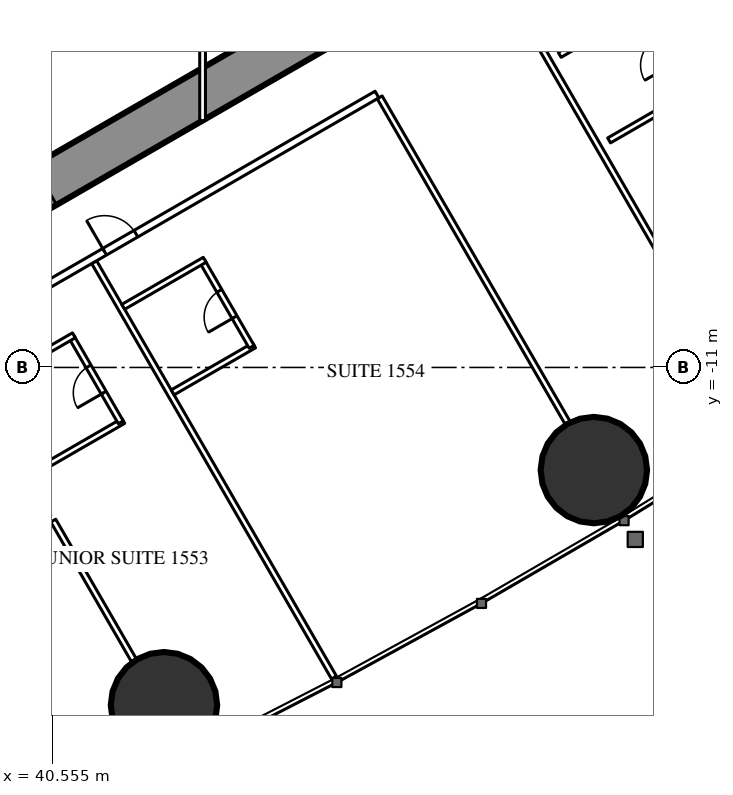
"""IFC4 building model, lengths in metres.
Left out: names, types, materials, properties, quantities, classifications, styles, units other than length and angle.
Written with IfcOpenShell. Run it as: python <this file> out.ifc"""

import sys

from ifc_helpers import new_model, si_unit, direction, frame, frame_2d, origin, origin_2d, place, context, subcontext, project, spatial, rectangle, hollow_circle, extrude, element, fill, save


model = new_model("IFC4")
c1 = context("Model", 3, precision=1e-05, world=origin(), true_north=direction((0.0, 1.0)))
c2 = subcontext(c1, "Body", "Model", "MODEL_VIEW")
j1 = project(units=[si_unit("LENGTHUNIT", "METRE"), si_unit("PLANEANGLEUNIT", "RADIAN")], contexts=[c1])
p1 = place(None, origin())
s1 = spatial("IfcSite", under=j1, at=p1, CompositionType="ELEMENT")
p2 = place(p1, origin())
s2 = spatial("IfcBuilding", under=s1, at=p2, CompositionType="ELEMENT")
p3 = place(p2, frame((0.0, 0.0, 60.0)))
s3 = spatial("IfcBuildingStorey", under=s2, at=p3, CompositionType="ELEMENT", Elevation=60.0)
for number, where, z_axis, x_axis in (
    (1, (43.484, -19.886, 0.0), (0.0, 0.0, 1.0), (1.0, 0.0, 0.0)),
    (2, (54.795, -13.701, 0.0), (0.0, 0.0, 1.0), (1.0, 0.0, 0.0)),
):
    element("IfcColumn", number, at=place(p3, frame(where, z_axis=z_axis, x_axis=x_axis)), inside=s3, PredefinedType="COLUMN", context=c2, shape_type="SweptSolid", body=[
        extrude(hollow_circle(Radius=1.4, WallThickness=0.12, at=origin_2d()), origin(), (0.0, 0.0, 1.0), 3.5),
    ])
p4 = place(p3, frame((27.2, -13.8, 0.0), z_axis=(0.0, 0.0, 1.0), x_axis=(0.866027159892, 0.499996958321, 0.0)))
e3 = element("IfcWall", 3, at=p4, inside=s3, PredefinedType="SHEAR", context=c2, shape_type="SweptSolid", body=[
    extrude(rectangle(XDim=27.947, YDim=1.2, at=frame_2d((13.973, 0.0))), origin(), (0.0, 0.0, 1.0), 3.5),
])
p5 = place(p4, frame((4.6, 0.0, 0.0)))
e4 = element("IfcOpeningElement", 4, at=p5, cuts=e3, PredefinedType="OPENING", context=c2, shape_type="SweptSolid", body=[
    extrude(rectangle(XDim=1.0, YDim=2.2, at=frame_2d((0.5, 1.1))), frame((0.0, 0.61, 0.0), z_axis=(0.0, -1.0, 0.0), x_axis=(1.0, 0.0, 0.0)), (0.0, 0.0, 1.0), 1.22),
])
p6 = place(p4, frame((13.395, 0.0, 0.0)))
e5 = element("IfcOpeningElement", 5, at=p6, cuts=e3, PredefinedType="OPENING", context=c2, shape_type="SweptSolid", body=[
    extrude(rectangle(XDim=1.8, YDim=2.2, at=frame_2d((0.9, 1.1))), frame((0.0, 0.61, 0.0), z_axis=(0.0, -1.0, 0.0), x_axis=(1.0, 0.0, 0.0)), (0.0, 0.0, 1.0), 1.22),
])
p7 = place(p3, frame((41.647, -8.23, 0.0), z_axis=(0.0, 0.0, 1.0), x_axis=(0.49998590462, -0.866033541603, 0.0)))
e6 = element("IfcWall", 6, at=p7, inside=s3, PredefinedType="PARTITIONING", context=c2, shape_type="SweptSolid", body=[
    extrude(rectangle(XDim=12.621, YDim=0.15, at=frame_2d((6.311, 0.0))), origin(), (0.0, 0.0, 1.0), 3.25),
])
p8 = place(p3, frame((49.159, -3.893, 0.0), z_axis=(0.0, 0.0, 1.0), x_axis=(0.499998773722, -0.866026111775, 0.0)))
e7 = element("IfcWall", 7, at=p8, inside=s3, PredefinedType="PARTITIONING", context=c2, shape_type="SweptSolid", body=[
    extrude(rectangle(XDim=9.892, YDim=0.15, at=frame_2d((4.946, 0.0))), origin(), (0.0, 0.0, 1.0), 2.25),
])
p9 = place(p3, frame((52.915, -1.725, 0.0), z_axis=(0.0, 0.0, 1.0), x_axis=(0.499997163113, -0.866027041656, 0.0)))
e8 = element("IfcWall", 8, at=p9, inside=s3, PredefinedType="PARTITIONING", context=c2, shape_type="SweptSolid", body=[
    extrude(rectangle(XDim=12.591, YDim=0.15, at=frame_2d((6.295, 0.0))), origin(), (0.0, 0.0, 1.0), 3.25),
])
p10 = place(p3, frame((40.57, -15.03, 0.0), z_axis=(0.0, 0.0, 1.0), x_axis=(0.500012993597, -0.866017901798, 0.0)))
e9 = element("IfcWall", 9, at=p10, inside=s3, PredefinedType="PARTITIONING", context=c2, shape_type="SweptSolid", body=[
    extrude(rectangle(XDim=4.243, YDim=0.15, at=frame_2d((2.122, 0.0))), origin(), (0.0, 0.0, 1.0), 3.25),
])
p11 = place(p3, frame((37.96, -10.243, 0.0), z_axis=(0.0, 0.0, 1.0), x_axis=(0.866030548046, 0.499991089772, 0.0)))
e10 = element("IfcWall", 10, at=p11, inside=s3, PredefinedType="PARTITIONING", context=c2, shape_type="SweptSolid", body=[
    extrude(rectangle(XDim=12.849, YDim=0.2, at=frame_2d((6.425, 0.0))), origin(), (0.0, 0.0, 1.0), 3.25),
])
p12 = place(p11, frame((4.575, 0.0, 0.0)))
e11 = element("IfcOpeningElement", 11, at=p12, cuts=e10, PredefinedType="OPENING", context=c2, shape_type="SweptSolid", body=[
    extrude(rectangle(XDim=0.95, YDim=2.2, at=frame_2d((0.475, 1.1))), frame((0.0, 0.11, 0.0), z_axis=(0.0, -1.0, 0.0), x_axis=(1.0, 0.0, 0.0)), (0.0, 0.0, 1.0), 0.22),
])
p13 = place(p11, frame((0.6, 0.0, 0.0)))
e12 = element("IfcOpeningElement", 12, at=p13, cuts=e10, PredefinedType="OPENING", context=c2, shape_type="SweptSolid", body=[
    extrude(rectangle(XDim=0.95, YDim=2.2, at=frame_2d((0.475, 1.1))), frame((0.0, 0.11, 0.0), z_axis=(0.0, -1.0, 0.0), x_axis=(1.0, 0.0, 0.0)), (0.0, 0.0, 1.0), 0.22),
])
p14 = place(p3, frame((43.712, -11.657, 0.0), z_axis=(0.0, 0.0, 1.0), x_axis=(0.866006523861, 0.500032699561, 0.0)))
e13 = element("IfcWall", 13, at=p14, inside=s3, PredefinedType="PARTITIONING", context=c2, shape_type="SweptSolid", body=[
    extrude(rectangle(XDim=2.475, YDim=0.15, at=frame_2d((1.237, 0.0))), origin(), (0.0, 0.0, 1.0), 3.25),
])
p15 = place(p3, frame((44.491, -8.205, 0.0), z_axis=(0.0, 0.0, 1.0), x_axis=(0.500047596559, -0.865997922154, 0.0)))
e14 = element("IfcWall", 14, at=p15, inside=s3, PredefinedType="PARTITIONING", context=c2, shape_type="SweptSolid", body=[
    extrude(rectangle(XDim=2.6, YDim=0.15, at=frame_2d((1.3, 0.0))), origin(), (0.0, 0.0, 1.0), 3.25),
])
p16 = place(p15, frame((0.9, 0.0, 0.0)))
e15 = element("IfcOpeningElement", 15, at=p16, cuts=e14, PredefinedType="OPENING", context=c2, shape_type="SweptSolid", body=[
    extrude(rectangle(XDim=0.8, YDim=2.2, at=frame_2d((0.4, 1.1))), frame((0.0, 0.085, 0.0), z_axis=(0.0, -1.0, 0.0), x_axis=(1.0, 0.0, 0.0)), (0.0, 0.0, 1.0), 0.17),
])
p17 = place(p3, frame((42.412, -9.405, 0.0), z_axis=(0.0, 0.0, 1.0), x_axis=(0.866006523861, 0.500032699561, 0.0)))
e16 = element("IfcWall", 16, at=p17, inside=s3, PredefinedType="PARTITIONING", context=c2, shape_type="SweptSolid", body=[
    extrude(rectangle(XDim=2.475, YDim=0.15, at=frame_2d((1.237, 0.0))), origin(), (0.0, 0.0, 1.0), 3.25),
])
p18 = place(p3, frame((55.196, -5.026, 0.0), z_axis=(0.0, 0.0, 1.0), x_axis=(0.866073894602, 0.499916002032, 0.0)))
e17 = element("IfcWall", 17, at=p18, inside=s3, PredefinedType="PARTITIONING", context=c2, shape_type="SweptSolid", body=[
    extrude(rectangle(XDim=2.475, YDim=0.15, at=frame_2d((1.238, 0.0))), origin(), (0.0, 0.0, 1.0), 3.25),
])
p19 = place(p3, frame((55.975, -1.575, 0.0), z_axis=(0.0, 0.0, 1.0), x_axis=(0.500006934395, -0.866021400173, 0.0)))
e18 = element("IfcWall", 18, at=p19, inside=s3, PredefinedType="PARTITIONING", context=c2, shape_type="SweptSolid", body=[
    extrude(rectangle(XDim=2.6, YDim=0.15, at=frame_2d((1.3, 0.0))), origin(), (0.0, 0.0, 1.0), 3.25),
])
p20 = place(p19, frame((0.9, 0.0, 0.0)))
e19 = element("IfcOpeningElement", 19, at=p20, cuts=e18, PredefinedType="OPENING", context=c2, shape_type="SweptSolid", body=[
    extrude(rectangle(XDim=0.8, YDim=2.2, at=frame_2d((0.4, 1.1))), frame((0.0, 0.085, 0.0), z_axis=(0.0, -1.0, 0.0), x_axis=(1.0, 0.0, 0.0)), (0.0, 0.0, 1.0), 0.17),
])
p21 = place(p3, frame((53.896, -2.775, 0.0), z_axis=(0.0, 0.0, 1.0), x_axis=(0.866006523861, 0.500032699561, 0.0)))
e20 = element("IfcWall", 20, at=p21, inside=s3, PredefinedType="PARTITIONING", context=c2, shape_type="SweptSolid", body=[
    extrude(rectangle(XDim=2.475, YDim=0.15, at=frame_2d((1.237, 0.0))), origin(), (0.0, 0.0, 1.0), 3.25),
])
p22 = place(p3, frame((40.27, -13.644, 0.0), z_axis=(0.0, 0.0, 1.0), x_axis=(0.866031185235, 0.4999899861, 0.0)))
e21 = element("IfcWall", 21, at=p22, inside=s3, PredefinedType="PARTITIONING", context=c2, shape_type="SweptSolid", body=[
    extrude(rectangle(XDim=2.475, YDim=0.15, at=frame_2d((1.238, 0.0))), origin(), (0.0, 0.0, 1.0), 3.25),
])
p23 = place(p3, frame((41.048, -10.193, 0.0), z_axis=(0.0, 0.0, 1.0), x_axis=(0.500047596559, -0.865997922154, 0.0)))
e22 = element("IfcWall", 22, at=p23, inside=s3, PredefinedType="PARTITIONING", context=c2, shape_type="SweptSolid", body=[
    extrude(rectangle(XDim=2.6, YDim=0.15, at=frame_2d((1.3, 0.0))), origin(), (0.0, 0.0, 1.0), 3.25),
])
p24 = place(p23, frame((0.9, 0.0, 0.0)))
e23 = element("IfcOpeningElement", 23, at=p24, cuts=e22, PredefinedType="OPENING", context=c2, shape_type="SweptSolid", body=[
    extrude(rectangle(XDim=0.8, YDim=2.2, at=frame_2d((0.4, 1.1))), frame((0.0, 0.085, 0.0), z_axis=(0.0, -1.0, 0.0), x_axis=(1.0, 0.0, 0.0)), (0.0, 0.0, 1.0), 0.17),
])
p25 = place(p3, frame((38.97, -11.393, 0.0), z_axis=(0.0, 0.0, 1.0), x_axis=(0.866031185235, 0.4999899861, 0.0)))
e24 = element("IfcWall", 24, at=p25, inside=s3, PredefinedType="PARTITIONING", context=c2, shape_type="SweptSolid", body=[
    extrude(rectangle(XDim=2.475, YDim=0.15, at=frame_2d((1.238, 0.0))), origin(), (0.0, 0.0, 1.0), 3.25),
])
p26 = place(p3, frame((44.5, -4.505, 0.0), z_axis=(0.0, 0.0, 1.0), x_axis=(0.0, 1.0, 0.0)))
e25 = element("IfcWall", 25, at=p26, inside=s3, PredefinedType="PARTITIONING", context=c2, shape_type="SweptSolid", body=[
    extrude(rectangle(XDim=9.009, YDim=0.15, at=frame_2d((4.505, 0.0))), origin(), (0.0, 0.0, 1.0), 2.45),
])
p27 = place(p26, frame((4.005, 0.0, 0.0)))
e26 = element("IfcOpeningElement", 26, at=p27, cuts=e25, PredefinedType="OPENING", context=c2, shape_type="SweptSolid", body=[
    extrude(rectangle(XDim=1.0, YDim=2.2, at=frame_2d((0.5, 1.1))), frame((0.0, 0.085, 0.0), z_axis=(0.0, -1.0, 0.0), x_axis=(1.0, 0.0, 0.0)), (0.0, 0.0, 1.0), 0.17),
])
p28 = place(p16, origin())
e27 = element("IfcDoor", 27, at=p28, inside=s3, OperationType="SINGLE_SWING_RIGHT", PredefinedType="DOOR", context=c2, shape_type="SweptSolid", body=[
    extrude(rectangle(XDim=0.8, YDim=2.2, at=frame_2d((0.4, 1.1))), frame((0.0, 0.025, 0.0), z_axis=(0.0, -1.0, 0.0), x_axis=(1.0, 0.0, 0.0)), (0.0, 0.0, 1.0), 0.05),
])
fill(e15, e27)
p29 = place(p12, origin())
e28 = element("IfcDoor", 28, at=p29, inside=s3, OperationType="SINGLE_SWING_LEFT", PredefinedType="DOOR", context=c2, shape_type="SweptSolid", body=[
    extrude(rectangle(XDim=0.95, YDim=2.2, at=frame_2d((0.475, 1.1))), frame((0.0, 0.025, 0.0), z_axis=(0.0, -1.0, 0.0), x_axis=(1.0, 0.0, 0.0)), (0.0, 0.0, 1.0), 0.05),
])
fill(e11, e28)
p30 = place(p24, origin())
e29 = element("IfcDoor", 29, at=p30, inside=s3, OperationType="SINGLE_SWING_RIGHT", PredefinedType="DOOR", context=c2, shape_type="SweptSolid", body=[
    extrude(rectangle(XDim=0.8, YDim=2.2, at=frame_2d((0.4, 1.1))), frame((0.0, 0.025, 0.0), z_axis=(0.0, -1.0, 0.0), x_axis=(1.0, 0.0, 0.0)), (0.0, 0.0, 1.0), 0.05),
])
fill(e23, e29)
save(model, sys.argv[1])
